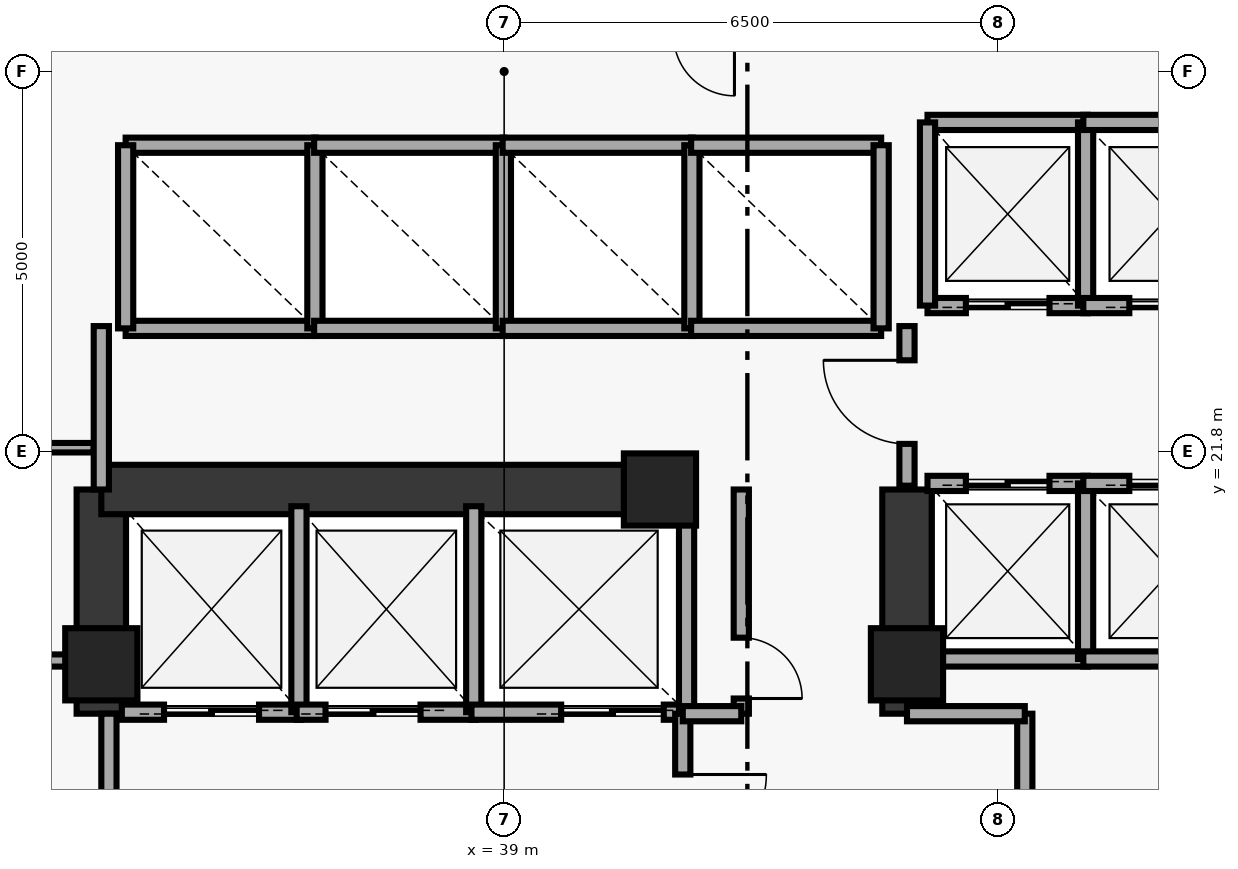
"""IFC4 building model, lengths in metres.
Left out: names, types, materials, properties, quantities, classifications, styles, units other than length and angle.
Written with IfcOpenShell. Run it as: python <this file> out.ifc"""

import sys

from ifc_helpers import new_model, si_unit, direction, frame, frame_2d, origin, origin_2d, place, context, subcontext, project, spatial, rectangle, extrude, element, fill, save


model = new_model("IFC4")
c1 = context("Model", 3, precision=1e-05, world=origin(), true_north=direction((0.0, 1.0)))
c2 = subcontext(c1, "Body", "Model", "MODEL_VIEW")
j1 = project(units=[si_unit("LENGTHUNIT", "METRE"), si_unit("PLANEANGLEUNIT", "RADIAN")], contexts=[c1])
p1 = place(None, origin())
s1 = spatial("IfcSite", under=j1, at=p1, CompositionType="ELEMENT")
p2 = place(p1, origin())
s2 = spatial("IfcBuilding", under=s1, at=p2, CompositionType="ELEMENT")
p3 = place(p2, frame((0.0, 0.0, 195.95)))
s3 = spatial("IfcBuildingStorey", under=s2, at=p3, CompositionType="ELEMENT", Elevation=195.95)
for number, where, z_axis, x_axis in (
    (1, (33.7, 19.0, 0.0), (0.0, 0.0, 1.0), (1.0, 0.0, 0.0)),
    (2, (41.05, 21.3, 0.0), (0.0, 0.0, 1.0), (1.0, 0.0, 0.0)),
    (3, (44.3, 19.0, 0.0), (0.0, 0.0, 1.0), (1.0, 0.0, 0.0)),
):
    element("IfcColumn", number, at=place(p3, frame(where, z_axis=z_axis, x_axis=x_axis)), inside=s3, PredefinedType="PILASTER", context=c2, shape_type="SweptSolid", body=[
        extrude(rectangle(XDim=0.95, YDim=0.95, at=origin_2d()), origin(), (0.0, 0.0, 1.0), 6.88),
    ])
for number, where, z_axis, x_axis in (
    (4, (33.7, 18.35, 0.0), (0.0, 0.0, 1.0), (0.0, 1.0, 0.0)),
    (5, (44.3, 18.35, 0.0), (0.0, 0.0, 1.0), (0.0, 1.0, 0.0)),
):
    element("IfcWall", number, at=place(p3, frame(where, z_axis=z_axis, x_axis=x_axis)), inside=s3, PredefinedType="SHEAR", context=c2, shape_type="SweptSolid", body=[
        extrude(rectangle(XDim=2.95, YDim=0.65, at=frame_2d((1.475, 0.0))), origin(), (0.0, 0.0, 1.0), 6.88),
    ])
p4 = place(p3, frame((33.7, 21.3, 0.0), z_axis=(0.0, 0.0, 1.0), x_axis=(1.0, 0.0, 0.0)))
e6 = element("IfcWall", 6, at=p4, inside=s3, PredefinedType="SHEAR", context=c2, shape_type="SweptSolid", body=[
    extrude(rectangle(XDim=7.55, YDim=0.65, at=frame_2d((3.775, 0.0))), origin(), (0.0, 0.0, 1.0), 6.88),
])
p5 = place(p3, frame((44.57, 23.72, 0.0), z_axis=(0.0, 0.0, 1.0), x_axis=(1.0, 0.0, 0.0)))
e7 = element("IfcWall", 7, at=p5, inside=s3, PredefinedType="SOLIDWALL", context=c2, shape_type="SweptSolid", body=[
    extrude(rectangle(XDim=2.11, YDim=0.2, at=frame_2d((1.055, 0.0))), origin(), (0.0, 0.0, 1.0), 6.88),
])
p6 = place(p5, frame((0.505, 0.0, 0.0)))
e8 = element("IfcOpeningElement", 8, at=p6, cuts=e7, PredefinedType="OPENING", context=c2, shape_type="SweptSolid", body=[
    extrude(rectangle(XDim=1.1, YDim=2.15, at=frame_2d((0.55, 1.075))), frame((0.0, 0.11, 0.0), z_axis=(0.0, -1.0, 0.0), x_axis=(1.0, 0.0, 0.0)), (0.0, 0.0, 1.0), 0.22),
])
p7 = place(p3, frame((44.57, 26.13, 0.0), z_axis=(0.0, 0.0, 1.0), x_axis=(1.0, 0.0, 0.0)))
e9 = element("IfcWall", 9, at=p7, inside=s3, PredefinedType="SOLIDWALL", context=c2, shape_type="SweptSolid", body=[
    extrude(rectangle(XDim=2.11, YDim=0.2, at=frame_2d((1.055, 0.0))), origin(), (0.0, 0.0, 1.0), 6.88),
])
for number, where, z_axis, x_axis in (
    (10, (44.57, 23.72, 0.0), (0.0, 0.0, 1.0), (0.0, 1.0, 0.0)),
    (11, (46.65, 23.72, 0.0), (0.0, 0.0, 1.0), (0.0, 1.0, 0.0)),
):
    element("IfcWall", number, at=place(p3, frame(where, z_axis=z_axis, x_axis=x_axis)), inside=s3, PredefinedType="SOLIDWALL", context=c2, shape_type="SweptSolid", body=[
        extrude(rectangle(XDim=2.41, YDim=0.2, at=frame_2d((1.205, 0.0))), origin(), (0.0, 0.0, 1.0), 6.88),
    ])
p8 = place(p3, frame((46.62, 23.72, 0.0), z_axis=(0.0, 0.0, 1.0), x_axis=(1.0, 0.0, 0.0)))
e12 = element("IfcWall", 12, at=p8, inside=s3, PredefinedType="SOLIDWALL", context=c2, shape_type="SweptSolid", body=[
    extrude(rectangle(XDim=2.31, YDim=0.2, at=frame_2d((1.155, 0.0))), origin(), (0.0, 0.0, 1.0), 6.88),
])
p9 = place(p8, frame((0.605, 0.0, 0.0)))
e13 = element("IfcOpeningElement", 13, at=p9, cuts=e12, PredefinedType="OPENING", context=c2, shape_type="SweptSolid", body=[
    extrude(rectangle(XDim=1.1, YDim=2.15, at=frame_2d((0.55, 1.075))), frame((0.0, 0.11, 0.0), z_axis=(0.0, -1.0, 0.0), x_axis=(1.0, 0.0, 0.0)), (0.0, 0.0, 1.0), 0.22),
])
p10 = place(p3, frame((46.62, 26.13, 0.0), z_axis=(0.0, 0.0, 1.0), x_axis=(1.0, 0.0, 0.0)))
e14 = element("IfcWall", 14, at=p10, inside=s3, PredefinedType="SOLIDWALL", context=c2, shape_type="SweptSolid", body=[
    extrude(rectangle(XDim=2.31, YDim=0.2, at=frame_2d((1.155, 0.0))), origin(), (0.0, 0.0, 1.0), 6.88),
])
p11 = place(p3, frame((44.57, 19.07, 0.0), z_axis=(0.0, 0.0, 1.0), x_axis=(1.0, 0.0, 0.0)))
e15 = element("IfcWall", 15, at=p11, inside=s3, PredefinedType="SOLIDWALL", context=c2, shape_type="SweptSolid", body=[
    extrude(rectangle(XDim=2.11, YDim=0.2, at=frame_2d((1.055, 0.0))), origin(), (0.0, 0.0, 1.0), 6.88),
])
p12 = place(p3, frame((44.57, 21.38, 0.0), z_axis=(0.0, 0.0, 1.0), x_axis=(1.0, 0.0, 0.0)))
e16 = element("IfcWall", 16, at=p12, inside=s3, PredefinedType="SOLIDWALL", context=c2, shape_type="SweptSolid", body=[
    extrude(rectangle(XDim=2.11, YDim=0.2, at=frame_2d((1.055, 0.0))), origin(), (0.0, 0.0, 1.0), 6.88),
])
p13 = place(p12, frame((0.505, 0.0, 0.0)))
e17 = element("IfcOpeningElement", 17, at=p13, cuts=e16, PredefinedType="OPENING", context=c2, shape_type="SweptSolid", body=[
    extrude(rectangle(XDim=1.1, YDim=2.15, at=frame_2d((0.55, 1.075))), frame((0.0, 0.11, 0.0), z_axis=(0.0, -1.0, 0.0), x_axis=(1.0, 0.0, 0.0)), (0.0, 0.0, 1.0), 0.22),
])
for number, where, z_axis, x_axis in (
    (18, (46.65, 19.07, 0.0), (0.0, 0.0, 1.0), (0.0, 1.0, 0.0)),
    (19, (46.62, 19.07, 0.0), (0.0, 0.0, 1.0), (1.0, 0.0, 0.0)),
):
    element("IfcWall", number, at=place(p3, frame(where, z_axis=z_axis, x_axis=x_axis)), inside=s3, PredefinedType="SOLIDWALL", context=c2, shape_type="SweptSolid", body=[
        extrude(rectangle(XDim=2.31, YDim=0.2, at=frame_2d((1.155, 0.0))), origin(), (0.0, 0.0, 1.0), 6.88),
    ])
p14 = place(p3, frame((46.62, 21.38, 0.0), z_axis=(0.0, 0.0, 1.0), x_axis=(1.0, 0.0, 0.0)))
e20 = element("IfcWall", 20, at=p14, inside=s3, PredefinedType="SOLIDWALL", context=c2, shape_type="SweptSolid", body=[
    extrude(rectangle(XDim=2.31, YDim=0.2, at=frame_2d((1.155, 0.0))), origin(), (0.0, 0.0, 1.0), 6.88),
])
p15 = place(p14, frame((0.605, 0.0, 0.0)))
e21 = element("IfcOpeningElement", 21, at=p15, cuts=e20, PredefinedType="OPENING", context=c2, shape_type="SweptSolid", body=[
    extrude(rectangle(XDim=1.1, YDim=2.15, at=frame_2d((0.55, 1.075))), frame((0.0, 0.11, 0.0), z_axis=(0.0, -1.0, 0.0), x_axis=(1.0, 0.0, 0.0)), (0.0, 0.0, 1.0), 0.22),
])
for number, where, z_axis, x_axis in (
    (22, (34.02, 23.42, 0.0), (0.0, 0.0, 1.0), (1.0, 0.0, 0.0)),
    (23, (34.02, 25.83, 0.0), (0.0, 0.0, 1.0), (1.0, 0.0, 0.0)),
):
    element("IfcWall", number, at=place(p3, frame(where, z_axis=z_axis, x_axis=x_axis)), inside=s3, PredefinedType="SOLIDWALL", context=c2, shape_type="SweptSolid", body=[
        extrude(rectangle(XDim=2.5, YDim=0.2, at=frame_2d((1.25, 0.0))), origin(), (0.0, 0.0, 1.0), 6.88),
    ])
for number, where, z_axis, x_axis in (
    (24, (34.02, 23.42, 0.0), (0.0, 0.0, 1.0), (0.0, 1.0, 0.0)),
    (25, (36.51, 23.42, 0.0), (0.0, 0.0, 1.0), (0.0, 1.0, 0.0)),
):
    element("IfcWall", number, at=place(p3, frame(where, z_axis=z_axis, x_axis=x_axis)), inside=s3, PredefinedType="SOLIDWALL", context=c2, shape_type="SweptSolid", body=[
        extrude(rectangle(XDim=2.41, YDim=0.2, at=frame_2d((1.205, 0.0))), origin(), (0.0, 0.0, 1.0), 6.88),
    ])
for number, where, z_axis, x_axis in (
    (26, (36.5, 23.42, 0.0), (0.0, 0.0, 1.0), (1.0, 0.0, 0.0)),
    (27, (36.5, 25.83, 0.0), (0.0, 0.0, 1.0), (1.0, 0.0, 0.0)),
):
    element("IfcWall", number, at=place(p3, frame(where, z_axis=z_axis, x_axis=x_axis)), inside=s3, PredefinedType="SOLIDWALL", context=c2, shape_type="SweptSolid", body=[
        extrude(rectangle(XDim=2.5, YDim=0.2, at=frame_2d((1.25, 0.0))), origin(), (0.0, 0.0, 1.0), 6.88),
    ])
p16 = place(p3, frame((38.99, 23.42, 0.0), z_axis=(0.0, 0.0, 1.0), x_axis=(0.0, 1.0, 0.0)))
e28 = element("IfcWall", 28, at=p16, inside=s3, PredefinedType="SOLIDWALL", context=c2, shape_type="SweptSolid", body=[
    extrude(rectangle(XDim=2.41, YDim=0.2, at=frame_2d((1.205, 0.0))), origin(), (0.0, 0.0, 1.0), 6.88),
])
for number, where, z_axis, x_axis in (
    (29, (38.98, 23.42, 0.0), (0.0, 0.0, 1.0), (1.0, 0.0, 0.0)),
    (30, (38.98, 25.83, 0.0), (0.0, 0.0, 1.0), (1.0, 0.0, 0.0)),
):
    element("IfcWall", number, at=place(p3, frame(where, z_axis=z_axis, x_axis=x_axis)), inside=s3, PredefinedType="SOLIDWALL", context=c2, shape_type="SweptSolid", body=[
        extrude(rectangle(XDim=2.5, YDim=0.2, at=frame_2d((1.25, 0.0))), origin(), (0.0, 0.0, 1.0), 6.88),
    ])
p17 = place(p3, frame((41.47, 23.42, 0.0), z_axis=(0.0, 0.0, 1.0), x_axis=(0.0, 1.0, 0.0)))
e31 = element("IfcWall", 31, at=p17, inside=s3, PredefinedType="SOLIDWALL", context=c2, shape_type="SweptSolid", body=[
    extrude(rectangle(XDim=2.41, YDim=0.2, at=frame_2d((1.205, 0.0))), origin(), (0.0, 0.0, 1.0), 6.88),
])
for number, where, z_axis, x_axis in (
    (32, (41.46, 23.42, 0.0), (0.0, 0.0, 1.0), (1.0, 0.0, 0.0)),
    (33, (41.46, 25.83, 0.0), (0.0, 0.0, 1.0), (1.0, 0.0, 0.0)),
):
    element("IfcWall", number, at=place(p3, frame(where, z_axis=z_axis, x_axis=x_axis)), inside=s3, PredefinedType="SOLIDWALL", context=c2, shape_type="SweptSolid", body=[
        extrude(rectangle(XDim=2.5, YDim=0.2, at=frame_2d((1.25, 0.0))), origin(), (0.0, 0.0, 1.0), 6.88),
    ])
p18 = place(p3, frame((43.96, 23.42, 0.0), z_axis=(0.0, 0.0, 1.0), x_axis=(0.0, 1.0, 0.0)))
e34 = element("IfcWall", 34, at=p18, inside=s3, PredefinedType="SOLIDWALL", context=c2, shape_type="SweptSolid", body=[
    extrude(rectangle(XDim=2.41, YDim=0.2, at=frame_2d((1.205, 0.0))), origin(), (0.0, 0.0, 1.0), 6.88),
])
p19 = place(p3, frame((33.97, 18.37, 0.0), z_axis=(0.0, 0.0, 1.0), x_axis=(1.0, 0.0, 0.0)))
e35 = element("IfcWall", 35, at=p19, inside=s3, PredefinedType="SOLIDWALL", context=c2, shape_type="SweptSolid", body=[
    extrude(rectangle(XDim=2.36, YDim=0.2, at=frame_2d((1.18, 0.0))), origin(), (0.0, 0.0, 1.0), 6.88),
])
p20 = place(p19, frame((0.555, 0.0, 0.0)))
e36 = element("IfcOpeningElement", 36, at=p20, cuts=e35, PredefinedType="OPENING", context=c2, shape_type="SweptSolid", body=[
    extrude(rectangle(XDim=1.25, YDim=2.2, at=frame_2d((0.625, 1.1))), frame((0.0, 0.11, 0.0), z_axis=(0.0, -1.0, 0.0), x_axis=(1.0, 0.0, 0.0)), (0.0, 0.0, 1.0), 0.22),
])
p21 = place(p3, frame((36.3, 18.37, 0.0), z_axis=(0.0, 0.0, 1.0), x_axis=(0.0, 1.0, 0.0)))
e37 = element("IfcWall", 37, at=p21, inside=s3, PredefinedType="SOLIDWALL", context=c2, shape_type="SweptSolid", body=[
    extrude(rectangle(XDim=2.71, YDim=0.2, at=frame_2d((1.355, 0.0))), origin(), (0.0, 0.0, 1.0), 6.88),
])
p22 = place(p3, frame((36.27, 18.37, 0.0), z_axis=(0.0, 0.0, 1.0), x_axis=(1.0, 0.0, 0.0)))
e38 = element("IfcWall", 38, at=p22, inside=s3, PredefinedType="SOLIDWALL", context=c2, shape_type="SweptSolid", body=[
    extrude(rectangle(XDim=2.36, YDim=0.2, at=frame_2d((1.18, 0.0))), origin(), (0.0, 0.0, 1.0), 6.88),
])
p23 = place(p22, frame((0.38, 0.0, 0.0)))
e39 = element("IfcOpeningElement", 39, at=p23, cuts=e38, PredefinedType="OPENING", context=c2, shape_type="SweptSolid", body=[
    extrude(rectangle(XDim=1.25, YDim=2.2, at=frame_2d((0.625, 1.1))), frame((0.0, 0.11, 0.0), z_axis=(0.0, -1.0, 0.0), x_axis=(1.0, 0.0, 0.0)), (0.0, 0.0, 1.0), 0.22),
])
p24 = place(p3, frame((38.6, 18.37, 0.0), z_axis=(0.0, 0.0, 1.0), x_axis=(0.0, 1.0, 0.0)))
e40 = element("IfcWall", 40, at=p24, inside=s3, PredefinedType="SOLIDWALL", context=c2, shape_type="SweptSolid", body=[
    extrude(rectangle(XDim=2.71, YDim=0.2, at=frame_2d((1.355, 0.0))), origin(), (0.0, 0.0, 1.0), 6.88),
])
p25 = place(p3, frame((38.57, 18.37, 0.0), z_axis=(0.0, 0.0, 1.0), x_axis=(1.0, 0.0, 0.0)))
e41 = element("IfcWall", 41, at=p25, inside=s3, PredefinedType="SOLIDWALL", context=c2, shape_type="SweptSolid", body=[
    extrude(rectangle(XDim=2.83, YDim=0.2, at=frame_2d((1.415, 0.0))), origin(), (0.0, 0.0, 1.0), 6.88),
])
p26 = place(p25, frame((1.18, 0.0, 0.0)))
e42 = element("IfcOpeningElement", 42, at=p26, cuts=e41, PredefinedType="OPENING", context=c2, shape_type="SweptSolid", body=[
    extrude(rectangle(XDim=1.35, YDim=2.18, at=frame_2d((0.675, 1.09))), frame((0.0, 0.11, 0.0), z_axis=(0.0, -1.0, 0.0), x_axis=(1.0, 0.0, 0.0)), (0.0, 0.0, 1.0), 0.22),
])
p27 = place(p3, frame((41.4, 18.37, 0.0), z_axis=(0.0, 0.0, 1.0), x_axis=(0.0, 1.0, 0.0)))
e43 = element("IfcWall", 43, at=p27, inside=s3, PredefinedType="SOLIDWALL", context=c2, shape_type="SweptSolid", body=[
    extrude(rectangle(XDim=2.71, YDim=0.2, at=frame_2d((1.355, 0.0))), origin(), (0.0, 0.0, 1.0), 6.88),
])
p28 = place(p3, frame((29.05, 19.05, 0.0), z_axis=(0.0, 0.0, 1.0), x_axis=(1.0, 0.0, 0.0)))
e44 = element("IfcWall", 44, at=p28, inside=s3, PredefinedType="PARTITIONING", context=c2, shape_type="SweptSolid", body=[
    extrude(rectangle(XDim=4.65, YDim=0.16, at=frame_2d((2.325, 0.0))), origin(), (0.0, 0.0, 1.0), 6.88),
])
p29 = place(p3, frame((33.6, 21.85, 0.0), z_axis=(0.0, 0.0, 1.0), x_axis=(-1.0, 0.0, 0.0)))
e45 = element("IfcWall", 45, at=p29, inside=s3, PredefinedType="PARTITIONING", context=c2, shape_type="SweptSolid", body=[
    extrude(rectangle(XDim=4.55, YDim=0.125, at=frame_2d((2.275, 0.0))), origin(), (0.0, 0.0, 1.0), 6.88),
])
p30 = place(p29, frame((3.2, 0.0, 0.0)))
e46 = element("IfcOpeningElement", 46, at=p30, cuts=e45, PredefinedType="OPENING", context=c2, shape_type="SweptSolid", body=[
    extrude(rectangle(XDim=0.8, YDim=2.05, at=frame_2d((0.4, 1.025))), frame((0.0, 0.073, 0.0), z_axis=(0.0, -1.0, 0.0), x_axis=(1.0, 0.0, 0.0)), (0.0, 0.0, 1.0), 0.145),
])
p31 = place(p29, frame((1.0, 0.0, 0.0)))
e47 = element("IfcOpeningElement", 47, at=p31, cuts=e45, PredefinedType="OPENING", context=c2, shape_type="SweptSolid", body=[
    extrude(rectangle(XDim=0.8, YDim=2.05, at=frame_2d((0.4, 1.025))), frame((0.0, 0.073, 0.0), z_axis=(0.0, -1.0, 0.0), x_axis=(1.0, 0.0, 0.0)), (0.0, 0.0, 1.0), 0.145),
])
p32 = place(p3, frame((33.7, 21.3, 0.0), z_axis=(0.0, 0.0, 1.0), x_axis=(0.0, 1.0, 0.0)))
e48 = element("IfcWall", 48, at=p32, inside=s3, PredefinedType="SOLIDWALL", context=c2, shape_type="SweptSolid", body=[
    extrude(rectangle(XDim=2.15, YDim=0.2, at=frame_2d((1.075, 0.0))), origin(), (0.0, 0.0, 1.0), 6.265),
])
p33 = place(p3, frame((44.3, 21.35, 0.0), z_axis=(0.0, 0.0, 1.0), x_axis=(0.0, 1.0, 0.0)))
e49 = element("IfcWall", 49, at=p33, inside=s3, PredefinedType="SOLIDWALL", context=c2, shape_type="SweptSolid", body=[
    extrude(rectangle(XDim=2.1, YDim=0.2, at=frame_2d((1.05, 0.0))), origin(), (0.0, 0.0, 1.0), 6.265),
])
p34 = place(p33, frame((0.55, 0.0, 0.0)))
e50 = element("IfcOpeningElement", 50, at=p34, cuts=e49, PredefinedType="OPENING", context=c2, shape_type="SweptSolid", body=[
    extrude(rectangle(XDim=1.1, YDim=2.15, at=frame_2d((0.55, 1.075))), frame((0.0, 0.11, 0.0), z_axis=(0.0, -1.0, 0.0), x_axis=(1.0, 0.0, 0.0)), (0.0, 0.0, 1.0), 0.22),
])
p35 = place(p3, frame((33.8, 15.55, 0.0), z_axis=(0.0, 0.0, 1.0), x_axis=(0.0, 1.0, 0.0)))
e51 = element("IfcWall", 51, at=p35, inside=s3, PredefinedType="SOLIDWALL", context=c2, shape_type="SweptSolid", body=[
    extrude(rectangle(XDim=2.8, YDim=0.2, at=frame_2d((1.4, 0.0))), origin(), (0.0, 0.0, 1.0), 6.88),
])
p36 = place(p3, frame((41.35, 15.55, 0.0), z_axis=(0.0, 0.0, 1.0), x_axis=(0.0, 1.0, 0.0)))
e52 = element("IfcWall", 52, at=p36, inside=s3, PredefinedType="SOLIDWALL", context=c2, shape_type="SweptSolid", body=[
    extrude(rectangle(XDim=2.8, YDim=0.2, at=frame_2d((1.4, 0.0))), origin(), (0.0, 0.0, 1.0), 6.88),
])
p37 = place(p36, frame((0.9, 0.0, 0.0)))
e53 = element("IfcOpeningElement", 53, at=p37, cuts=e52, PredefinedType="OPENING", context=c2, shape_type="SweptSolid", body=[
    extrude(rectangle(XDim=1.1, YDim=2.15, at=frame_2d((0.55, 1.075))), frame((0.0, 0.11, 0.0), z_axis=(0.0, -1.0, 0.0), x_axis=(1.0, 0.0, 0.0)), (0.0, 0.0, 1.0), 0.22),
])
p38 = place(p3, frame((45.85, 16.05, 0.0), z_axis=(0.0, 0.0, 1.0), x_axis=(0.0, 1.0, 0.0)))
e54 = element("IfcWall", 54, at=p38, inside=s3, PredefinedType="SOLIDWALL", context=c2, shape_type="SweptSolid", body=[
    extrude(rectangle(XDim=2.3, YDim=0.2, at=frame_2d((1.15, 0.0))), origin(), (0.0, 0.0, 1.0), 6.88),
])
p39 = place(p3, frame((44.3, 18.35, 0.0), z_axis=(0.0, 0.0, 1.0), x_axis=(1.0, 0.0, 0.0)))
e55 = element("IfcWall", 55, at=p39, inside=s3, PredefinedType="SOLIDWALL", context=c2, shape_type="SweptSolid", body=[
    extrude(rectangle(XDim=1.55, YDim=0.2, at=frame_2d((0.775, 0.0))), origin(), (0.0, 0.0, 1.0), 6.88),
])
p40 = place(p3, frame((42.12, 18.35, 0.0), z_axis=(0.0, 0.0, 1.0), x_axis=(0.0, 1.0, 0.0)))
e56 = element("IfcWall", 56, at=p40, inside=s3, PredefinedType="SOLIDWALL", context=c2, shape_type="SweptSolid", body=[
    extrude(rectangle(XDim=2.95, YDim=0.2, at=frame_2d((1.475, 0.0))), origin(), (0.0, 0.0, 1.0), 6.88),
])
p41 = place(p40, frame((0.2, 0.0, 0.0)))
e57 = element("IfcOpeningElement", 57, at=p41, cuts=e56, PredefinedType="OPENING", context=c2, shape_type="SweptSolid", body=[
    extrude(rectangle(XDim=0.8, YDim=2.05, at=frame_2d((0.4, 1.025))), frame((0.0, 0.11, 0.0), z_axis=(0.0, -1.0, 0.0), x_axis=(1.0, 0.0, 0.0)), (0.0, 0.0, 1.0), 0.22),
])
p42 = place(p3, frame((41.35, 18.35, 0.0), z_axis=(0.0, 0.0, 1.0), x_axis=(1.0, 0.0, 0.0)))
e58 = element("IfcWall", 58, at=p42, inside=s3, PredefinedType="SOLIDWALL", context=c2, shape_type="SweptSolid", body=[
    extrude(rectangle(XDim=0.77, YDim=0.2, at=frame_2d((0.385, 0.0))), origin(), (0.0, 0.0, 1.0), 6.88),
])
p43 = place(p6, origin())
e59 = element("IfcDoor", 59, at=p43, inside=s3, OperationType="DOUBLE_DOOR_SLIDING", PredefinedType="DOOR", context=c2, shape_type="SweptSolid", body=[
    extrude(rectangle(XDim=1.1, YDim=2.15, at=frame_2d((0.55, 1.075))), frame((0.0, 0.025, 0.0), z_axis=(0.0, -1.0, 0.0), x_axis=(1.0, 0.0, 0.0)), (0.0, 0.0, 1.0), 0.05),
])
fill(e8, e59)
p44 = place(p9, origin())
e60 = element("IfcDoor", 60, at=p44, inside=s3, OperationType="DOUBLE_DOOR_SLIDING", PredefinedType="DOOR", context=c2, shape_type="SweptSolid", body=[
    extrude(rectangle(XDim=1.1, YDim=2.15, at=frame_2d((0.55, 1.075))), frame((0.0, 0.025, 0.0), z_axis=(0.0, -1.0, 0.0), x_axis=(1.0, 0.0, 0.0)), (0.0, 0.0, 1.0), 0.05),
])
fill(e13, e60)
p45 = place(p13, origin())
e61 = element("IfcDoor", 61, at=p45, inside=s3, OperationType="DOUBLE_DOOR_SLIDING", PredefinedType="DOOR", context=c2, shape_type="SweptSolid", body=[
    extrude(rectangle(XDim=1.1, YDim=2.15, at=frame_2d((0.55, 1.075))), frame((0.0, 0.025, 0.0), z_axis=(0.0, -1.0, 0.0), x_axis=(1.0, 0.0, 0.0)), (0.0, 0.0, 1.0), 0.05),
])
fill(e17, e61)
p46 = place(p15, origin())
e62 = element("IfcDoor", 62, at=p46, inside=s3, OperationType="DOUBLE_DOOR_SLIDING", PredefinedType="DOOR", context=c2, shape_type="SweptSolid", body=[
    extrude(rectangle(XDim=1.1, YDim=2.15, at=frame_2d((0.55, 1.075))), frame((0.0, 0.025, 0.0), z_axis=(0.0, -1.0, 0.0), x_axis=(1.0, 0.0, 0.0)), (0.0, 0.0, 1.0), 0.05),
])
fill(e21, e62)
p47 = place(p20, origin())
e63 = element("IfcDoor", 63, at=p47, inside=s3, OperationType="DOUBLE_DOOR_SLIDING", PredefinedType="DOOR", context=c2, shape_type="SweptSolid", body=[
    extrude(rectangle(XDim=1.25, YDim=2.2, at=frame_2d((0.625, 1.1))), frame((0.0, 0.025, 0.0), z_axis=(0.0, -1.0, 0.0), x_axis=(1.0, 0.0, 0.0)), (0.0, 0.0, 1.0), 0.05),
])
fill(e36, e63)
p48 = place(p23, origin())
e64 = element("IfcDoor", 64, at=p48, inside=s3, OperationType="DOUBLE_DOOR_SLIDING", PredefinedType="DOOR", context=c2, shape_type="SweptSolid", body=[
    extrude(rectangle(XDim=1.25, YDim=2.2, at=frame_2d((0.625, 1.1))), frame((0.0, 0.025, 0.0), z_axis=(0.0, -1.0, 0.0), x_axis=(1.0, 0.0, 0.0)), (0.0, 0.0, 1.0), 0.05),
])
fill(e39, e64)
p49 = place(p26, origin())
e65 = element("IfcDoor", 65, at=p49, inside=s3, OperationType="DOUBLE_DOOR_SLIDING", PredefinedType="DOOR", context=c2, shape_type="SweptSolid", body=[
    extrude(rectangle(XDim=1.35, YDim=2.18, at=frame_2d((0.675, 1.09))), frame((0.0, 0.025, 0.0), z_axis=(0.0, -1.0, 0.0), x_axis=(1.0, 0.0, 0.0)), (0.0, 0.0, 1.0), 0.05),
])
fill(e42, e65)
p50 = place(p34, origin())
e66 = element("IfcDoor", 66, at=p50, inside=s3, OperationType="SINGLE_SWING_RIGHT", PredefinedType="DOOR", context=c2, shape_type="SweptSolid", body=[
    extrude(rectangle(XDim=1.1, YDim=2.15, at=frame_2d((0.55, 1.075))), frame((0.0, 0.025, 0.0), z_axis=(0.0, -1.0, 0.0), x_axis=(1.0, 0.0, 0.0)), (0.0, 0.0, 1.0), 0.05),
])
fill(e50, e66)
p51 = place(p37, origin())
e67 = element("IfcDoor", 67, at=p51, inside=s3, OperationType="SINGLE_SWING_RIGHT", PredefinedType="DOOR", context=c2, shape_type="SweptSolid", body=[
    extrude(rectangle(XDim=1.1, YDim=2.15, at=frame_2d((0.55, 1.075))), frame((0.0, 0.025, 0.0), z_axis=(0.0, -1.0, 0.0), x_axis=(1.0, 0.0, 0.0)), (0.0, 0.0, 1.0), 0.05),
])
fill(e53, e67)
p52 = place(p41, origin())
e68 = element("IfcDoor", 68, at=p52, inside=s3, OperationType="SINGLE_SWING_LEFT", PredefinedType="DOOR", context=c2, shape_type="SweptSolid", body=[
    extrude(rectangle(XDim=0.8, YDim=2.05, at=frame_2d((0.4, 1.025))), frame((0.0, 0.025, 0.0), z_axis=(0.0, -1.0, 0.0), x_axis=(1.0, 0.0, 0.0)), (0.0, 0.0, 1.0), 0.05),
])
fill(e57, e68)
save(model, sys.argv[1])
